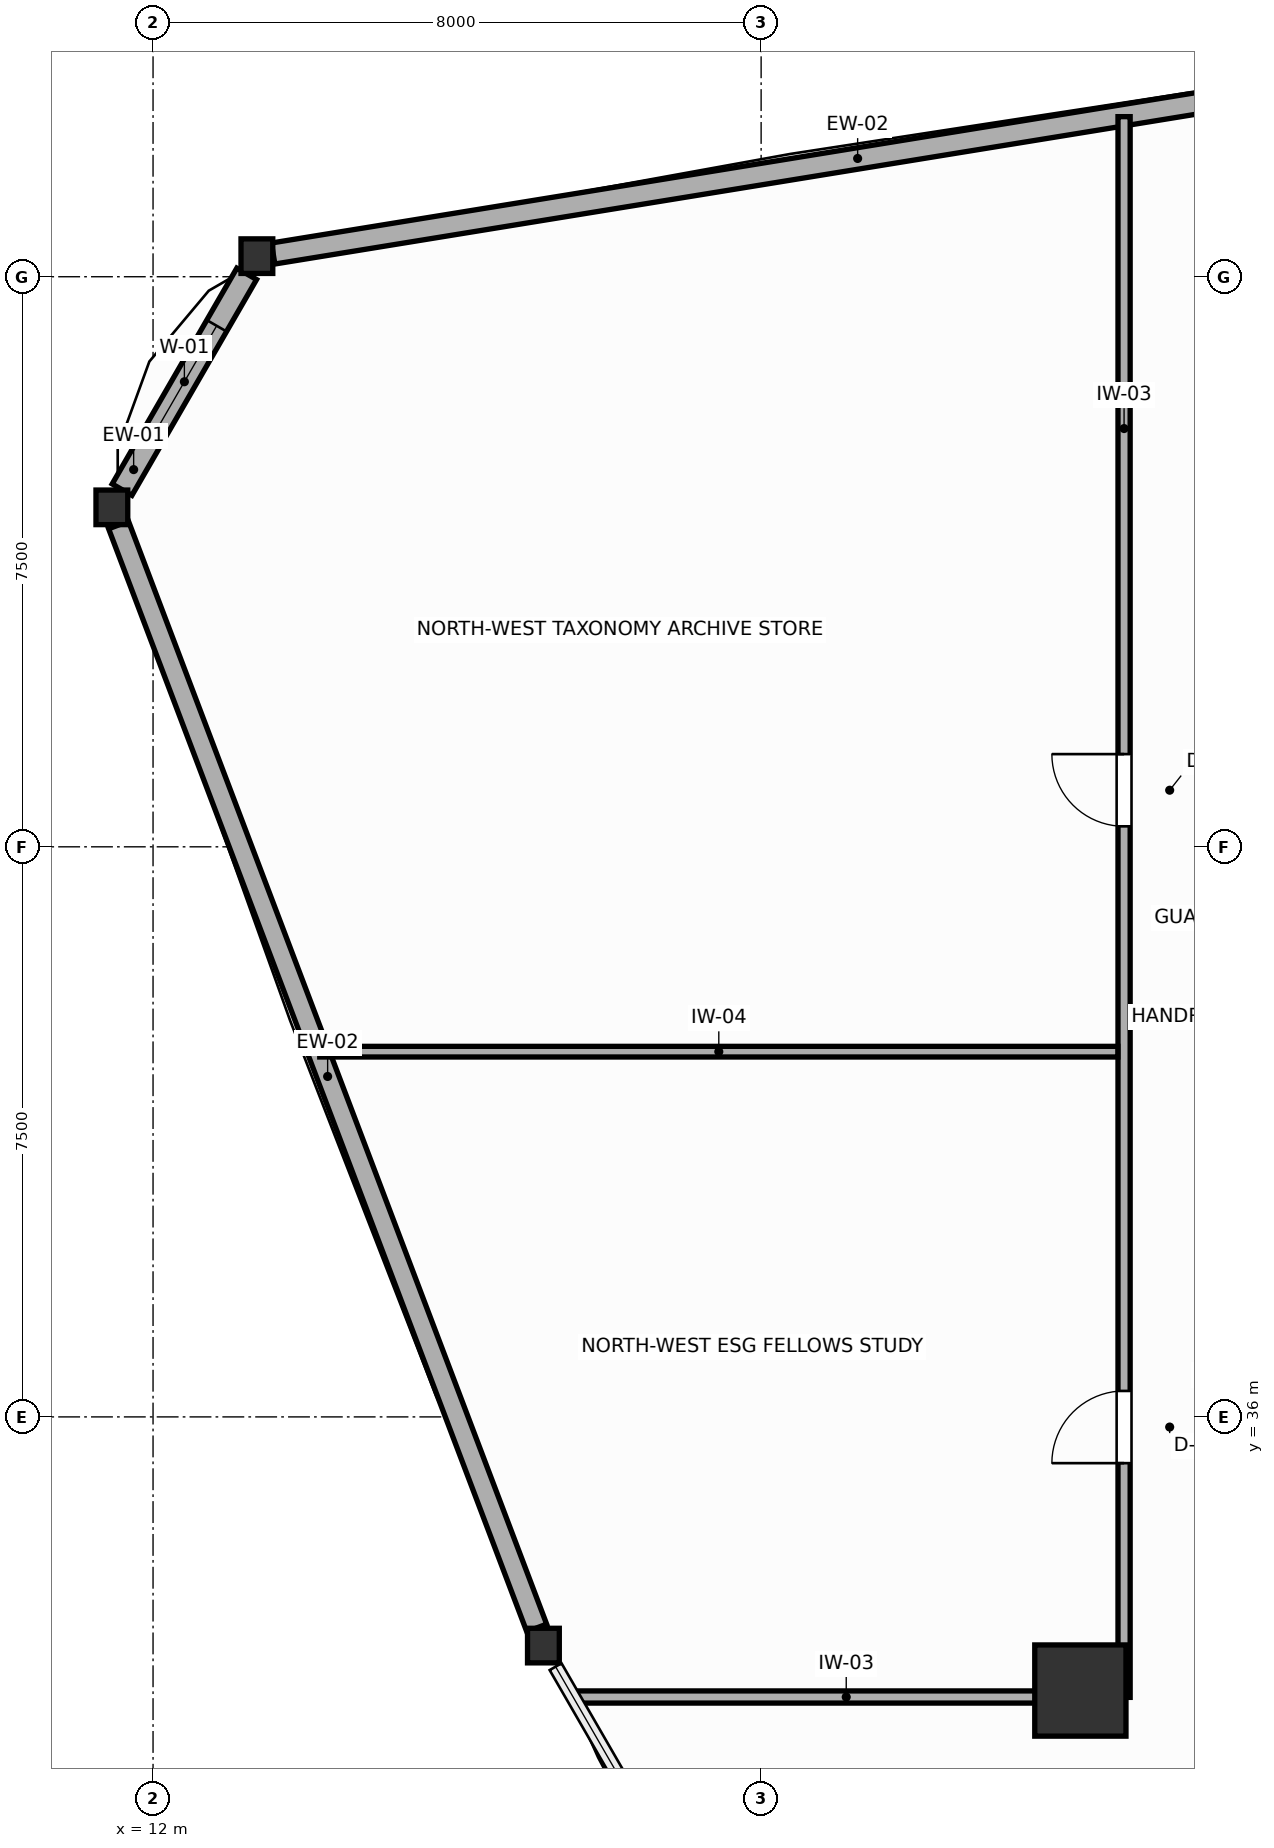
"""IFC4 building model, lengths in metres.
Left out: names, types, materials, properties, quantities, classifications, styles, units other than length and angle.
Written with IfcOpenShell. Run it as: python <this file> out.ifc"""

import sys

from ifc_helpers import new_model, si_unit, direction, frame, frame_2d, origin, origin_2d, place, context, subcontext, project, spatial, rectangle, i_section, extrude, source, transform, mapped, element, fill, save


model = new_model("IFC4")
c1 = context("Model", 3, precision=1e-05, world=origin(), true_north=direction((0.0, 1.0)))
c2 = subcontext(c1, "Body", "Model", "MODEL_VIEW")
j1 = project(units=[si_unit("LENGTHUNIT", "METRE"), si_unit("PLANEANGLEUNIT", "RADIAN")], contexts=[c1])
p1 = place(None, origin())
s1 = spatial("IfcSite", under=j1, at=p1, CompositionType="ELEMENT")
p2 = place(p1, origin())
s2 = spatial("IfcBuilding", under=s1, at=p2, CompositionType="ELEMENT")
p3 = place(p2, frame((0.0, 0.0, 127.8)))
s3 = spatial("IfcBuildingStorey", under=s2, at=p3, CompositionType="ELEMENT", Elevation=127.8)
m1 = source(origin(), c2, "Body", "SweptSolid", [
    extrude(rectangle(XDim=1.2, YDim=1.2, at=origin_2d()), origin(), (0.0, 0.0, 1.0), 3.6),
])
p4 = place(p3, frame((24.2, 32.4, 0.0), z_axis=(0.0, 0.0, 1.0), x_axis=(1.0, 0.0, 0.0)))
e1 = element("IfcColumn", 1, at=p4, inside=s3, PredefinedType="COLUMN", context=c2, shape_type="MappedRepresentation", body=[
    mapped(m1, transform((0.0, 0.0, 0.0), scale=1.0)),
])
m2 = source(origin(), c2, "Body", "SweptSolid", [
    extrude(i_section(OverallWidth=0.418, OverallDepth=0.455, WebThickness=0.039, FlangeThickness=0.063, FilletRadius=0.015, at=origin_2d()), origin(), (0.0, 0.0, 1.0), 3.6),
])
for number, where, z_axis, x_axis in (
    (2, (13.366, 51.271, 0.0), (0.0, 0.0, 1.0), (1.0, 0.0, 0.0)),
    (3, (11.458, 47.966, 0.0), (0.0, 0.0, 1.0), (1.0, 0.0, 0.0)),
    (4, (17.136, 32.991, 0.0), (0.0, 0.0, 1.0), (1.0, 0.0, 0.0)),
):
    element("IfcColumn", number, at=place(p3, frame(where, z_axis=z_axis, x_axis=x_axis)), inside=s3, PredefinedType="COLUMN", context=c2, shape_type="MappedRepresentation", body=[
        mapped(m2, transform((0.0, 0.0, 0.0), scale=1.0)),
    ])
p5 = place(p3, frame((28.959, 53.806, 0.0), z_axis=(0.0, 0.0, 1.0), x_axis=(-0.987036263752, -0.160497395736, 0.0)))
e5 = element("IfcWall", 5, at=p5, inside=s3, PredefinedType="SOLIDWALL", context=c2, shape_type="SweptSolid", body=[
    extrude(rectangle(XDim=15.581, YDim=0.28, at=frame_2d((7.791, 0.0))), origin(), (0.0, 0.0, 1.0), 2.81),
])
p6 = place(p3, frame((13.232, 51.038, 0.0), z_axis=(0.0, 0.0, 1.0), x_axis=(-0.500014611105, -0.866016967894, 0.0)))
e6 = element("IfcWall", 6, at=p6, inside=s3, PredefinedType="SOLIDWALL", context=c2, shape_type="SweptSolid", body=[
    extrude(rectangle(XDim=3.279, YDim=0.3, at=frame_2d((1.64, 0.0))), origin(), (0.0, 0.0, 1.0), 2.86),
])
p7 = place(p6, frame((0.79, 0.0, 0.75)))
e7 = element("IfcOpeningElement", 7, at=p7, cuts=e6, PredefinedType="OPENING", context=c2, shape_type="SweptSolid", body=[
    extrude(rectangle(XDim=1.7, YDim=1.75, at=frame_2d((0.85, 0.875))), frame((0.0, 0.16, 0.0), z_axis=(0.0, -1.0, 0.0), x_axis=(1.0, 0.0, 0.0)), (0.0, 0.0, 1.0), 0.32),
])
p8 = place(p3, frame((11.546, 47.734, 0.0), z_axis=(0.0, 0.0, 1.0), x_axis=(0.354519532047, -0.935048609109, 0.0)))
e8 = element("IfcWall", 8, at=p8, inside=s3, PredefinedType="SOLIDWALL", context=c2, shape_type="SweptSolid", body=[
    extrude(rectangle(XDim=15.517, YDim=0.28, at=frame_2d((7.759, 0.0))), origin(), (0.0, 0.0, 1.0), 2.81),
])
p9 = place(p3, frame((24.775, 32.31, 0.0), z_axis=(0.0, 0.0, 1.0), x_axis=(0.0, 1.0, 0.0)))
e9 = element("IfcWall", 9, at=p9, inside=s3, PredefinedType="PARTITIONING", context=c2, shape_type="SweptSolid", body=[
    extrude(rectangle(XDim=20.796, YDim=0.16, at=frame_2d((10.398, 0.0))), origin(), (0.0, 0.0, 1.0), 3.26),
])
p10 = place(p9, frame((3.082, 0.0, 0.0)))
e10 = element("IfcOpeningElement", 10, at=p10, cuts=e9, PredefinedType="OPENING", context=c2, shape_type="SweptSolid", body=[
    extrude(rectangle(XDim=0.95, YDim=2.05, at=frame_2d((0.475, 1.025))), frame((0.0, 0.09, 0.0), z_axis=(0.0, -1.0, 0.0), x_axis=(1.0, 0.0, 0.0)), (0.0, 0.0, 1.0), 0.18),
])
p11 = place(p9, frame((11.46, 0.0, 0.0)))
e11 = element("IfcOpeningElement", 11, at=p11, cuts=e9, PredefinedType="OPENING", context=c2, shape_type="SweptSolid", body=[
    extrude(rectangle(XDim=0.95, YDim=2.05, at=frame_2d((0.475, 1.025))), frame((0.0, 0.09, 0.0), z_axis=(0.0, -1.0, 0.0), x_axis=(1.0, 0.0, 0.0)), (0.0, 0.0, 1.0), 0.18),
])
p12 = place(p3, frame((17.546, 32.315, 0.0), z_axis=(0.0, 0.0, 1.0), x_axis=(1.0, 0.0, 0.0)))
e12 = element("IfcWall", 12, at=p12, inside=s3, PredefinedType="PARTITIONING", context=c2, shape_type="SweptSolid", body=[
    extrude(rectangle(XDim=7.147, YDim=0.16, at=frame_2d((3.573, 0.0))), origin(), (0.0, 0.0, 1.0), 2.81),
])
p13 = place(p3, frame((14.193, 40.805, 0.0), z_axis=(0.0, 0.0, 1.0), x_axis=(1.0, 0.0, 0.0)))
e13 = element("IfcWall", 13, at=p13, inside=s3, PredefinedType="PARTITIONING", context=c2, shape_type="SweptSolid", body=[
    extrude(rectangle(XDim=10.5, YDim=0.14, at=frame_2d((5.25, 0.0))), origin(), (0.0, 0.0, 1.0), 3.26),
])
p14 = place(p7, origin())
e14 = element("IfcWindow", 14, at=p14, inside=s3, PartitioningType="SINGLE_PANEL", PredefinedType="WINDOW", context=c2, shape_type="SweptSolid", body=[
    extrude(rectangle(XDim=1.7, YDim=1.75, at=frame_2d((0.85, 0.875))), frame((0.0, 0.03, 0.0), z_axis=(0.0, -1.0, 0.0), x_axis=(1.0, 0.0, 0.0)), (0.0, 0.0, 1.0), 0.06),
])
fill(e7, e14)
p15 = place(p10, origin())
e15 = element("IfcDoor", 15, at=p15, inside=s3, OperationType="SINGLE_SWING_LEFT", PredefinedType="DOOR", context=c2, shape_type="SweptSolid", body=[
    extrude(rectangle(XDim=0.95, YDim=2.05, at=frame_2d((0.475, 1.025))), frame((0.0, 0.025, 0.0), z_axis=(0.0, -1.0, 0.0), x_axis=(1.0, 0.0, 0.0)), (0.0, 0.0, 1.0), 0.05),
])
fill(e10, e15)
p16 = place(p11, origin())
e16 = element("IfcDoor", 16, at=p16, inside=s3, OperationType="SINGLE_SWING_RIGHT", PredefinedType="DOOR", context=c2, shape_type="SweptSolid", body=[
    extrude(rectangle(XDim=0.95, YDim=2.05, at=frame_2d((0.475, 1.025))), frame((0.0, 0.025, 0.0), z_axis=(0.0, -1.0, 0.0), x_axis=(1.0, 0.0, 0.0)), (0.0, 0.0, 1.0), 0.05),
])
fill(e11, e16)
save(model, sys.argv[1])
